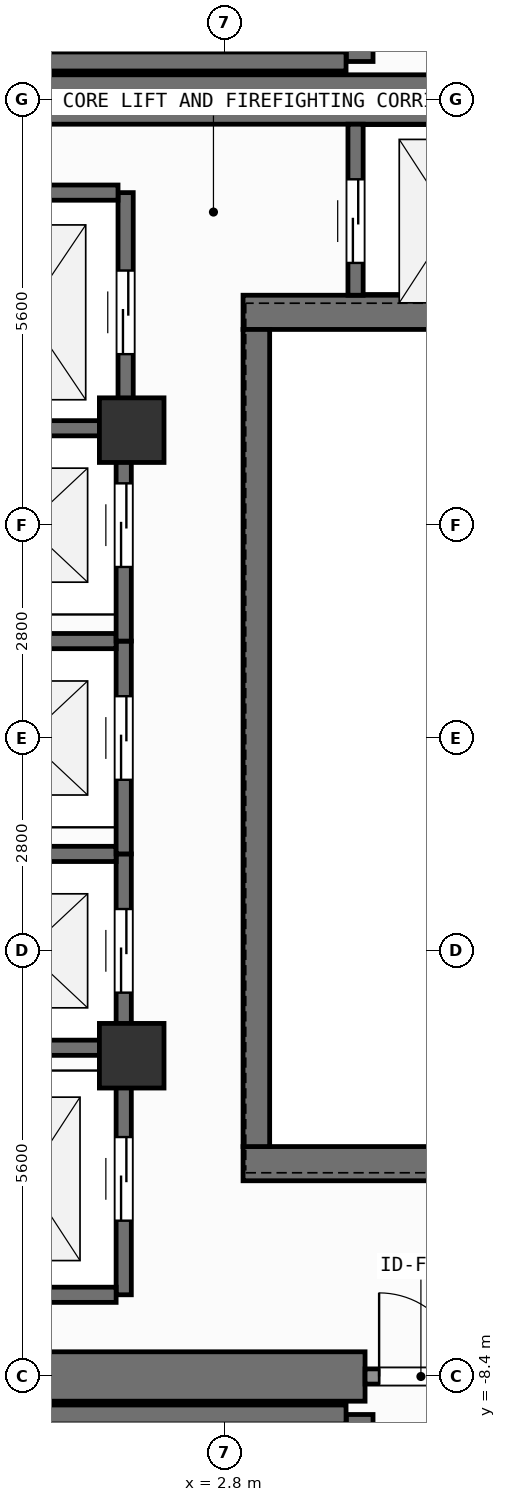
"""IFC4 building model, lengths in metres.
Left out: names, types, materials, properties, quantities, classifications, styles, units other than length and angle.
Written with IfcOpenShell. Run it as: python <this file> out.ifc"""

import sys

from ifc_helpers import new_model, si_unit, direction, frame, frame_2d, origin, origin_2d, place, context, subcontext, project, spatial, rectangle, extrude, element, fill, save


model = new_model("IFC4")
c1 = context("Model", 3, precision=1e-05, world=origin(), true_north=direction((0.0, 1.0)))
c2 = subcontext(c1, "Body", "Model", "MODEL_VIEW")
j1 = project(units=[si_unit("LENGTHUNIT", "METRE"), si_unit("PLANEANGLEUNIT", "RADIAN")], contexts=[c1])
p1 = place(None, origin())
s1 = spatial("IfcSite", under=j1, at=p1, CompositionType="ELEMENT")
p2 = place(p1, origin())
s2 = spatial("IfcBuilding", under=s1, at=p2, CompositionType="ELEMENT")
p3 = place(p2, frame((0.0, 0.0, 297.6)))
s3 = spatial("IfcBuildingStorey", under=s2, at=p3, CompositionType="ELEMENT", Elevation=297.6)
p4 = place(p3, frame((-2.62, -8.4, 0.0), z_axis=(0.0, 0.0, 1.0), x_axis=(1.0, 0.0, 0.0)))
e1 = element("IfcWall", 1, at=p4, inside=s3, PredefinedType="SHEAR", context=c2, shape_type="SweptSolid", body=[
    extrude(rectangle(XDim=7.27, YDim=0.65, at=frame_2d((3.635, 0.0))), origin(), (0.0, 0.0, 1.0), 3.9),
])
p5 = place(p3, frame((-7.55, 8.4, 0.0), z_axis=(0.0, 0.0, 1.0), x_axis=(1.0, 0.0, 0.0)))
e2 = element("IfcWall", 2, at=p5, inside=s3, PredefinedType="SHEAR", context=c2, shape_type="SweptSolid", body=[
    extrude(rectangle(XDim=16.275, YDim=0.65, at=frame_2d((8.138, 0.0))), origin(), (0.0, 0.0, 1.0), 3.9),
])
for number, where, z_axis, x_axis in (
    (3, (3.045, -5.6, 0.0), (0.0, 0.0, 1.0), (1.0, 0.0, 0.0)),
    (4, (3.045, 5.6, 0.0), (0.0, 0.0, 1.0), (1.0, 0.0, 0.0)),
):
    element("IfcWall", number, at=place(p3, frame(where, z_axis=z_axis, x_axis=x_axis)), inside=s3, PredefinedType="SHEAR", context=c2, shape_type="SweptSolid", body=[
        extrude(rectangle(XDim=5.68, YDim=0.45, at=frame_2d((2.84, 0.0))), origin(), (0.0, 0.0, 1.0), 3.9),
    ])
p6 = place(p3, frame((3.22, -5.375, 0.0), z_axis=(0.0, 0.0, 1.0), x_axis=(0.0, 1.0, 0.0)))
e5 = element("IfcWall", 5, at=p6, inside=s3, PredefinedType="SHEAR", context=c2, shape_type="SweptSolid", body=[
    extrude(rectangle(XDim=10.75, YDim=0.35, at=frame_2d((5.375, 0.0))), origin(), (0.0, 0.0, 1.0), 3.9),
])
p7 = place(p3, frame((-2.2, -8.9, 0.0), z_axis=(0.0, 0.0, 1.0), x_axis=(1.0, 0.0, 0.0)))
e6 = element("IfcWall", 6, at=p7, inside=s3, PredefinedType="SHEAR", context=c2, shape_type="SweptSolid", body=[
    extrude(rectangle(XDim=6.6, YDim=0.25, at=frame_2d((3.3, 0.0))), origin(), (0.0, 0.0, 1.0), 3.9),
])
p8 = place(p3, frame((4.58, -8.9, 0.0), z_axis=(0.0, 0.0, 1.0), x_axis=(0.0, -1.0, 0.0)))
e7 = element("IfcWall", 7, at=p8, inside=s3, PredefinedType="SHEAR", context=c2, shape_type="SweptSolid", body=[
    extrude(rectangle(XDim=2.925, YDim=0.35, at=frame_2d((1.462, 0.0))), origin(), (0.0, 0.0, 1.0), 3.9),
])
p9 = place(p8, frame((0.913, 0.0, 0.0)))
e8 = element("IfcOpeningElement", 8, at=p9, cuts=e7, PredefinedType="OPENING", context=c2, shape_type="SweptSolid", body=[
    extrude(rectangle(XDim=1.1, YDim=2.15, at=frame_2d((0.55, 1.075))), frame((0.0, 0.185, 0.0), z_axis=(0.0, -1.0, 0.0), x_axis=(1.0, 0.0, 0.0)), (0.0, 0.0, 1.0), 0.37),
])
p10 = place(p3, frame((-2.2, 8.9, 0.0), z_axis=(0.0, 0.0, 1.0), x_axis=(1.0, 0.0, 0.0)))
e9 = element("IfcWall", 9, at=p10, inside=s3, PredefinedType="SHEAR", context=c2, shape_type="SweptSolid", body=[
    extrude(rectangle(XDim=6.6, YDim=0.25, at=frame_2d((3.3, 0.0))), origin(), (0.0, 0.0, 1.0), 3.9),
])
p11 = place(p3, frame((4.58, 11.825, 0.0), z_axis=(0.0, 0.0, 1.0), x_axis=(0.0, -1.0, 0.0)))
e10 = element("IfcWall", 10, at=p11, inside=s3, PredefinedType="SHEAR", context=c2, shape_type="SweptSolid", body=[
    extrude(rectangle(XDim=2.925, YDim=0.35, at=frame_2d((1.462, 0.0))), origin(), (0.0, 0.0, 1.0), 3.9),
])
p12 = place(p11, frame((0.913, 0.0, 0.0)))
e11 = element("IfcOpeningElement", 11, at=p12, cuts=e10, PredefinedType="OPENING", context=c2, shape_type="SweptSolid", body=[
    extrude(rectangle(XDim=1.1, YDim=2.15, at=frame_2d((0.55, 1.075))), frame((0.0, 0.185, 0.0), z_axis=(0.0, -1.0, 0.0), x_axis=(1.0, 0.0, 0.0)), (0.0, 0.0, 1.0), 0.37),
])
for number, where, z_axis, x_axis in (
    (12, (1.58, -4.18, 0.0), (0.0, 0.0, 1.0), (1.0, 0.0, 0.0)),
    (13, (1.58, 4.05, 0.0), (0.0, 0.0, 1.0), (1.0, 0.0, 0.0)),
):
    element("IfcColumn", number, at=place(p3, frame(where, z_axis=z_axis, x_axis=x_axis)), inside=s3, PredefinedType="COLUMN", context=c2, shape_type="SweptSolid", body=[
        extrude(rectangle(XDim=0.85, YDim=0.85, at=origin_2d()), origin(), (0.0, 0.0, 1.0), 3.9),
    ])
p13 = place(p3, frame((1.475, -4.275, 0.0), z_axis=(0.0, 0.0, 1.0), x_axis=(0.0, 1.0, 0.0)))
e14 = element("IfcWall", 14, at=p13, inside=s3, PredefinedType="SHEAR", context=c2, shape_type="SweptSolid", body=[
    extrude(rectangle(XDim=2.75, YDim=0.2, at=frame_2d((1.375, 0.0))), origin(), (0.0, 0.0, 1.0), 3.68),
])
p14 = place(p13, frame((0.925, 0.0, 0.0)))
e15 = element("IfcOpeningElement", 15, at=p14, cuts=e14, PredefinedType="OPENING", context=c2, shape_type="SweptSolid", body=[
    extrude(rectangle(XDim=1.1, YDim=2.2, at=frame_2d((0.55, 1.1))), frame((0.0, 0.11, 0.0), z_axis=(0.0, -1.0, 0.0), x_axis=(1.0, 0.0, 0.0)), (0.0, 0.0, 1.0), 0.22),
])
for number, where, z_axis, x_axis in (
    (16, (-0.975, -4.075, 0.0), (0.0, 0.0, 1.0), (1.0, 0.0, 0.0)),
    (17, (-0.975, -1.525, 0.0), (0.0, 0.0, 1.0), (1.0, 0.0, 0.0)),
):
    element("IfcWall", number, at=place(p3, frame(where, z_axis=z_axis, x_axis=x_axis)), inside=s3, PredefinedType="SHEAR", context=c2, shape_type="SweptSolid", body=[
        extrude(rectangle(XDim=2.35, YDim=0.2, at=frame_2d((1.175, 0.0))), origin(), (0.0, 0.0, 1.0), 3.68),
    ])
p15 = place(p3, frame((1.475, -1.525, 0.0), z_axis=(0.0, 0.0, 1.0), x_axis=(0.0, 1.0, 0.0)))
e18 = element("IfcWall", 18, at=p15, inside=s3, PredefinedType="SHEAR", context=c2, shape_type="SweptSolid", body=[
    extrude(rectangle(XDim=2.8, YDim=0.2, at=frame_2d((1.4, 0.0))), origin(), (0.0, 0.0, 1.0), 3.68),
])
p16 = place(p15, frame((0.975, 0.0, 0.0)))
e19 = element("IfcOpeningElement", 19, at=p16, cuts=e18, PredefinedType="OPENING", context=c2, shape_type="SweptSolid", body=[
    extrude(rectangle(XDim=1.1, YDim=2.2, at=frame_2d((0.55, 1.1))), frame((0.0, 0.11, 0.0), z_axis=(0.0, -1.0, 0.0), x_axis=(1.0, 0.0, 0.0)), (0.0, 0.0, 1.0), 0.22),
])
p17 = place(p3, frame((-0.975, 1.275, 0.0), z_axis=(0.0, 0.0, 1.0), x_axis=(1.0, 0.0, 0.0)))
e20 = element("IfcWall", 20, at=p17, inside=s3, PredefinedType="SHEAR", context=c2, shape_type="SweptSolid", body=[
    extrude(rectangle(XDim=2.35, YDim=0.2, at=frame_2d((1.175, 0.0))), origin(), (0.0, 0.0, 1.0), 3.68),
])
p18 = place(p3, frame((1.475, 1.275, 0.0), z_axis=(0.0, 0.0, 1.0), x_axis=(0.0, 1.0, 0.0)))
e21 = element("IfcWall", 21, at=p18, inside=s3, PredefinedType="SHEAR", context=c2, shape_type="SweptSolid", body=[
    extrude(rectangle(XDim=2.8, YDim=0.2, at=frame_2d((1.4, 0.0))), origin(), (0.0, 0.0, 1.0), 3.68),
])
p19 = place(p18, frame((0.975, 0.0, 0.0)))
e22 = element("IfcOpeningElement", 22, at=p19, cuts=e21, PredefinedType="OPENING", context=c2, shape_type="SweptSolid", body=[
    extrude(rectangle(XDim=1.1, YDim=2.2, at=frame_2d((0.55, 1.1))), frame((0.0, 0.11, 0.0), z_axis=(0.0, -1.0, 0.0), x_axis=(1.0, 0.0, 0.0)), (0.0, 0.0, 1.0), 0.22),
])
p20 = place(p3, frame((-0.975, 4.075, 0.0), z_axis=(0.0, 0.0, 1.0), x_axis=(1.0, 0.0, 0.0)))
e23 = element("IfcWall", 23, at=p20, inside=s3, PredefinedType="SHEAR", context=c2, shape_type="SweptSolid", body=[
    extrude(rectangle(XDim=2.35, YDim=0.2, at=frame_2d((1.175, 0.0))), origin(), (0.0, 0.0, 1.0), 3.68),
])
p21 = place(p3, frame((1.5, 4.025, 0.0), z_axis=(0.0, 0.0, 1.0), x_axis=(0.0, 1.0, 0.0)))
e24 = element("IfcWall", 24, at=p21, inside=s3, PredefinedType="SHEAR", context=c2, shape_type="SweptSolid", body=[
    extrude(rectangle(XDim=3.15, YDim=0.2, at=frame_2d((1.575, 0.0))), origin(), (0.0, 0.0, 1.0), 3.68),
])
p22 = place(p21, frame((1.025, 0.0, 0.0)))
e25 = element("IfcOpeningElement", 25, at=p22, cuts=e24, PredefinedType="OPENING", context=c2, shape_type="SweptSolid", body=[
    extrude(rectangle(XDim=1.1, YDim=2.2, at=frame_2d((0.55, 1.1))), frame((0.0, 0.11, 0.0), z_axis=(0.0, -1.0, 0.0), x_axis=(1.0, 0.0, 0.0)), (0.0, 0.0, 1.0), 0.22),
])
p23 = place(p3, frame((-1.0, 7.175, 0.0), z_axis=(0.0, 0.0, 1.0), x_axis=(1.0, 0.0, 0.0)))
e26 = element("IfcWall", 26, at=p23, inside=s3, PredefinedType="SHEAR", context=c2, shape_type="SweptSolid", body=[
    extrude(rectangle(XDim=2.4, YDim=0.2, at=frame_2d((1.2, 0.0))), origin(), (0.0, 0.0, 1.0), 3.68),
])
p24 = place(p3, frame((1.475, -7.325, 0.0), z_axis=(0.0, 0.0, 1.0), x_axis=(0.0, 1.0, 0.0)))
e27 = element("IfcWall", 27, at=p24, inside=s3, PredefinedType="SHEAR", context=c2, shape_type="SweptSolid", body=[
    extrude(rectangle(XDim=3.05, YDim=0.2, at=frame_2d((1.525, 0.0))), origin(), (0.0, 0.0, 1.0), 3.68),
])
p25 = place(p24, frame((0.975, 0.0, 0.0)))
e28 = element("IfcOpeningElement", 28, at=p25, cuts=e27, PredefinedType="OPENING", context=c2, shape_type="SweptSolid", body=[
    extrude(rectangle(XDim=1.1, YDim=2.2, at=frame_2d((0.55, 1.1))), frame((0.0, 0.11, 0.0), z_axis=(0.0, -1.0, 0.0), x_axis=(1.0, 0.0, 0.0)), (0.0, 0.0, 1.0), 0.22),
])
p26 = place(p3, frame((-0.975, -7.325, 0.0), z_axis=(0.0, 0.0, 1.0), x_axis=(1.0, 0.0, 0.0)))
e29 = element("IfcWall", 29, at=p26, inside=s3, PredefinedType="SHEAR", context=c2, shape_type="SweptSolid", body=[
    extrude(rectangle(XDim=2.35, YDim=0.2, at=frame_2d((1.175, 0.0))), origin(), (0.0, 0.0, 1.0), 3.68),
])
p27 = place(p3, frame((4.525, 5.825, 0.0), z_axis=(0.0, 0.0, 1.0), x_axis=(0.0, 1.0, 0.0)))
e30 = element("IfcWall", 30, at=p27, inside=s3, PredefinedType="SHEAR", context=c2, shape_type="SweptSolid", body=[
    extrude(rectangle(XDim=2.25, YDim=0.2, at=frame_2d((1.125, 0.0))), origin(), (0.0, 0.0, 1.0), 3.68),
])
p28 = place(p27, frame((0.425, 0.0, 0.0)))
e31 = element("IfcOpeningElement", 31, at=p28, cuts=e30, PredefinedType="OPENING", context=c2, shape_type="SweptSolid", body=[
    extrude(rectangle(XDim=1.1, YDim=2.2, at=frame_2d((0.55, 1.1))), frame((0.0, 0.11, 0.0), z_axis=(0.0, -1.0, 0.0), x_axis=(1.0, 0.0, 0.0)), (0.0, 0.0, 1.0), 0.22),
])
p29 = place(p3, frame((4.65, -8.4, 0.0), z_axis=(0.0, 0.0, 1.0), x_axis=(1.0, 0.0, 0.0)))
e32 = element("IfcWall", 32, at=p29, inside=s3, PredefinedType="SOLIDWALL", context=c2, shape_type="SweptSolid", body=[
    extrude(rectangle(XDim=1.47, YDim=0.2, at=frame_2d((0.735, 0.0))), origin(), (0.0, 0.0, 1.0), 2.92),
])
p30 = place(p29, frame((0.185, 0.0, 0.0)))
e33 = element("IfcOpeningElement", 33, at=p30, cuts=e32, PredefinedType="OPENING", context=c2, shape_type="SweptSolid", body=[
    extrude(rectangle(XDim=1.1, YDim=2.15, at=frame_2d((0.55, 1.075))), frame((0.0, 0.11, 0.0), z_axis=(0.0, -1.0, 0.0), x_axis=(1.0, 0.0, 0.0)), (0.0, 0.0, 1.0), 0.22),
])
p31 = place(p14, origin())
e34 = element("IfcDoor", 34, at=p31, inside=s3, OperationType="SLIDING_TO_LEFT", PredefinedType="DOOR", context=c2, shape_type="SweptSolid", body=[
    extrude(rectangle(XDim=1.1, YDim=2.2, at=frame_2d((0.55, 1.1))), frame((0.0, 0.025, 0.0), z_axis=(0.0, -1.0, 0.0), x_axis=(1.0, 0.0, 0.0)), (0.0, 0.0, 1.0), 0.05),
])
fill(e15, e34)
p32 = place(p16, origin())
e35 = element("IfcDoor", 35, at=p32, inside=s3, OperationType="SLIDING_TO_LEFT", PredefinedType="DOOR", context=c2, shape_type="SweptSolid", body=[
    extrude(rectangle(XDim=1.1, YDim=2.2, at=frame_2d((0.55, 1.1))), frame((0.0, 0.025, 0.0), z_axis=(0.0, -1.0, 0.0), x_axis=(1.0, 0.0, 0.0)), (0.0, 0.0, 1.0), 0.05),
])
fill(e19, e35)
p33 = place(p19, origin())
e36 = element("IfcDoor", 36, at=p33, inside=s3, OperationType="SLIDING_TO_LEFT", PredefinedType="DOOR", context=c2, shape_type="SweptSolid", body=[
    extrude(rectangle(XDim=1.1, YDim=2.2, at=frame_2d((0.55, 1.1))), frame((0.0, 0.025, 0.0), z_axis=(0.0, -1.0, 0.0), x_axis=(1.0, 0.0, 0.0)), (0.0, 0.0, 1.0), 0.05),
])
fill(e22, e36)
p34 = place(p22, origin())
e37 = element("IfcDoor", 37, at=p34, inside=s3, OperationType="SLIDING_TO_LEFT", PredefinedType="DOOR", context=c2, shape_type="SweptSolid", body=[
    extrude(rectangle(XDim=1.1, YDim=2.2, at=frame_2d((0.55, 1.1))), frame((0.0, 0.025, 0.0), z_axis=(0.0, -1.0, 0.0), x_axis=(1.0, 0.0, 0.0)), (0.0, 0.0, 1.0), 0.05),
])
fill(e25, e37)
p35 = place(p25, origin())
e38 = element("IfcDoor", 38, at=p35, inside=s3, OperationType="SLIDING_TO_LEFT", PredefinedType="DOOR", context=c2, shape_type="SweptSolid", body=[
    extrude(rectangle(XDim=1.1, YDim=2.2, at=frame_2d((0.55, 1.1))), frame((0.0, 0.025, 0.0), z_axis=(0.0, -1.0, 0.0), x_axis=(1.0, 0.0, 0.0)), (0.0, 0.0, 1.0), 0.05),
])
fill(e28, e38)
p36 = place(p28, origin())
e39 = element("IfcDoor", 39, at=p36, inside=s3, OperationType="SLIDING_TO_LEFT", PredefinedType="DOOR", context=c2, shape_type="SweptSolid", body=[
    extrude(rectangle(XDim=1.1, YDim=2.2, at=frame_2d((0.55, 1.1))), frame((0.0, 0.025, 0.0), z_axis=(0.0, -1.0, 0.0), x_axis=(1.0, 0.0, 0.0)), (0.0, 0.0, 1.0), 0.05),
])
fill(e31, e39)
p37 = place(p30, origin())
e40 = element("IfcDoor", 40, at=p37, inside=s3, OperationType="SINGLE_SWING_LEFT", PredefinedType="DOOR", context=c2, shape_type="SweptSolid", body=[
    extrude(rectangle(XDim=1.1, YDim=2.15, at=frame_2d((0.55, 1.075))), frame((0.0, 0.025, 0.0), z_axis=(0.0, -1.0, 0.0), x_axis=(1.0, 0.0, 0.0)), (0.0, 0.0, 1.0), 0.05),
])
fill(e33, e40)
save(model, sys.argv[1])
